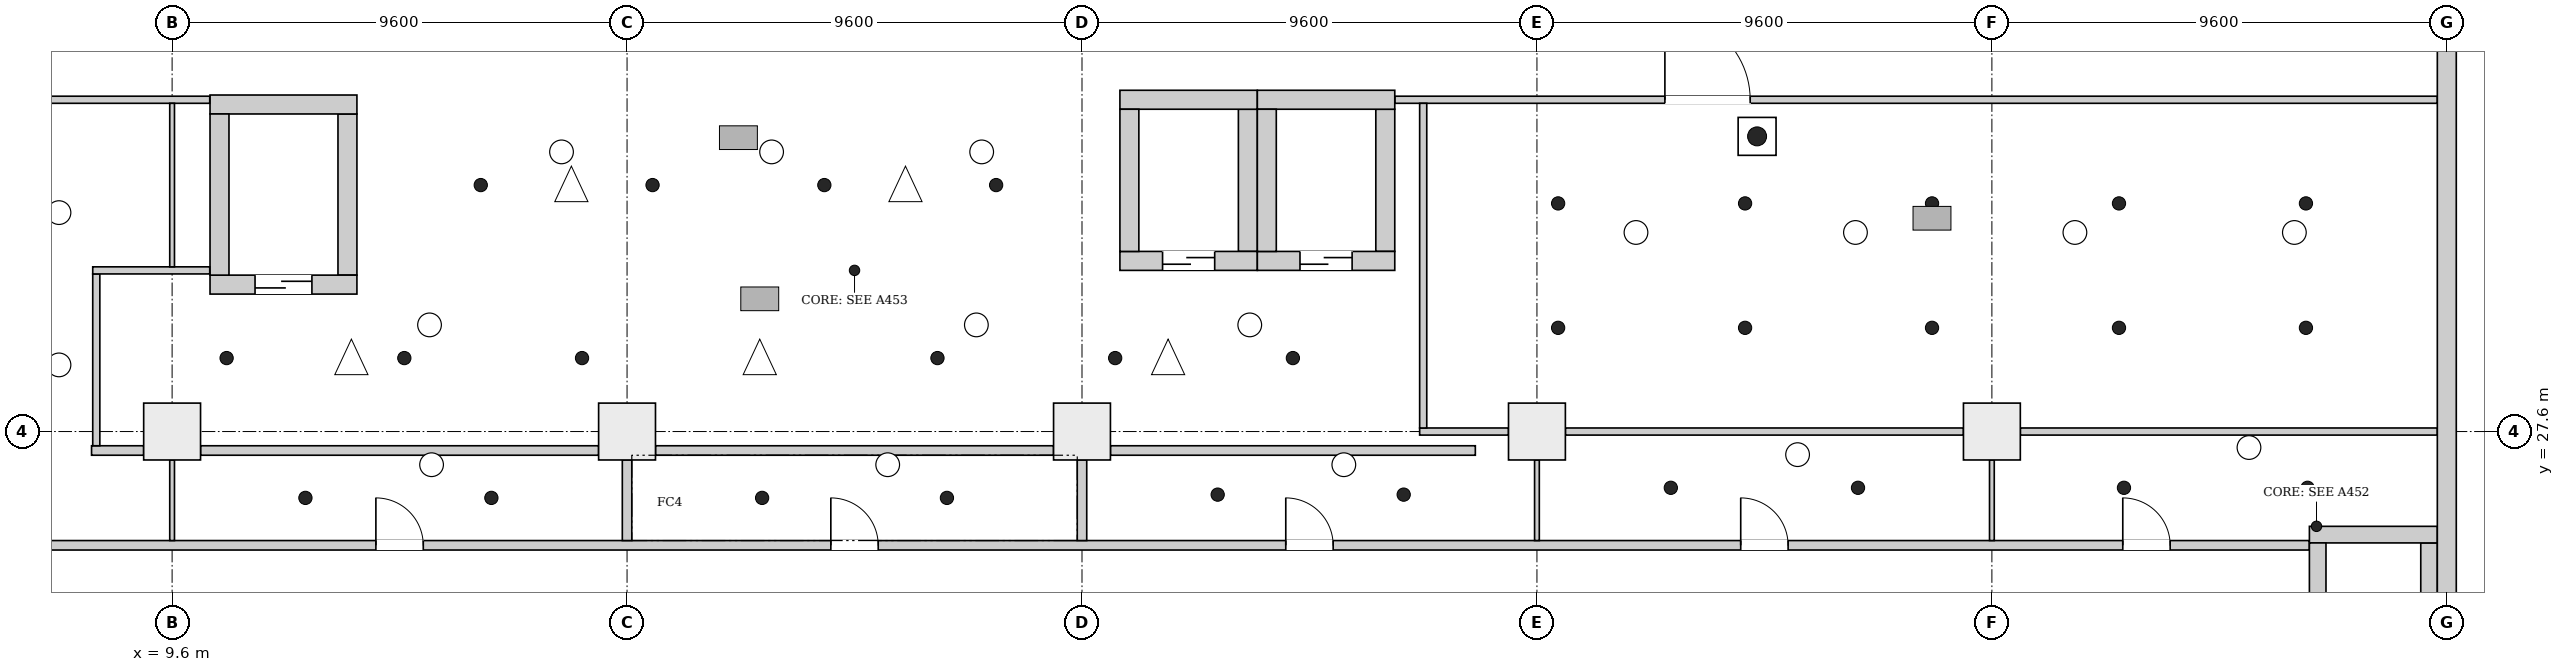
"""IFC4 building model, lengths in metres.
Left out: names, types, materials, properties, quantities, classifications, styles, units other than length and angle.
Written with IfcOpenShell. Run it as: python <this file> out.ifc"""

import sys

from ifc_helpers import new_model, si_unit, direction, frame, frame_2d, origin, origin_2d, place, context, subcontext, project, spatial, rectangle, extrude, element, fill, save


model = new_model("IFC4")
c1 = context("Model", 3, precision=1e-05, world=origin(), true_north=direction((0.0, 1.0)))
c2 = subcontext(c1, "Body", "Model", "MODEL_VIEW")
j1 = project(units=[si_unit("LENGTHUNIT", "METRE"), si_unit("PLANEANGLEUNIT", "RADIAN")], contexts=[c1])
p1 = place(None, origin())
s1 = spatial("IfcSite", under=j1, at=p1, CompositionType="ELEMENT")
p2 = place(p1, origin())
s2 = spatial("IfcBuilding", under=s1, at=p2, CompositionType="ELEMENT")
p3 = place(p2, frame((0.0, 0.0, 14.2)))
s3 = spatial("IfcBuildingStorey", under=s2, at=p3, CompositionType="ELEMENT", Elevation=14.2)
p4 = place(p3, frame((57.6, -0.2, 0.0), z_axis=(0.0, 0.0, 1.0), x_axis=(0.0, 1.0, 0.0)))
e1 = element("IfcWall", 1, at=p4, inside=s3, PredefinedType="SHEAR", context=c2, shape_type="SweptSolid", body=[
    extrude(rectangle(XDim=46.88, YDim=0.4, at=frame_2d((23.44, 0.0))), origin(), (0.0, 0.0, 1.0), 7.5),
])
p5 = place(p3, frame((54.7, 25.425, 0.0), z_axis=(0.0, 0.0, 1.0), x_axis=(1.0, 0.0, 0.0)))
e2 = element("IfcWall", 2, at=p5, inside=s3, PredefinedType="SHEAR", context=c2, shape_type="SweptSolid", body=[
    extrude(rectangle(XDim=2.7, YDim=0.35, at=frame_2d((1.35, 0.0))), origin(), (0.0, 0.0, 1.0), 7.5),
])
for number, where, z_axis, x_axis in (
    (3, (54.875, 21.75, 0.0), (0.0, 0.0, 1.0), (0.0, 1.0, 0.0)),
    (4, (57.225, 21.75, 0.0), (0.0, 0.0, 1.0), (0.0, 1.0, 0.0)),
):
    element("IfcWall", number, at=place(p3, frame(where, z_axis=z_axis, x_axis=x_axis)), inside=s3, PredefinedType="SHEAR", context=c2, shape_type="SweptSolid", body=[
        extrude(rectangle(XDim=3.5, YDim=0.35, at=frame_2d((1.75, 0.0))), origin(), (0.0, 0.0, 1.0), 7.5),
    ])
p6 = place(p3, frame((10.4, 30.7, 0.0), z_axis=(0.0, 0.0, 1.0), x_axis=(1.0, 0.0, 0.0)))
e5 = element("IfcWall", 5, at=p6, inside=s3, PredefinedType="SHEAR", context=c2, shape_type="SweptSolid", body=[
    extrude(rectangle(XDim=3.1, YDim=0.4, at=frame_2d((1.55, 0.0))), origin(), (0.0, 0.0, 1.0), 7.5),
])
p7 = place(p6, frame((0.95, 0.0, 0.0)))
e6 = element("IfcOpeningElement", 6, at=p7, cuts=e5, PredefinedType="OPENING", context=c2, shape_type="SweptSolid", body=[
    extrude(rectangle(XDim=1.2, YDim=2.1, at=frame_2d((0.6, 1.05))), frame((0.0, 0.21, 0.0), z_axis=(0.0, -1.0, 0.0), x_axis=(1.0, 0.0, 0.0)), (0.0, 0.0, 1.0), 0.42),
])
p8 = place(p3, frame((10.4, 34.5, 0.0), z_axis=(0.0, 0.0, 1.0), x_axis=(1.0, 0.0, 0.0)))
e7 = element("IfcWall", 7, at=p8, inside=s3, PredefinedType="SHEAR", context=c2, shape_type="SweptSolid", body=[
    extrude(rectangle(XDim=3.1, YDim=0.4, at=frame_2d((1.55, 0.0))), origin(), (0.0, 0.0, 1.0), 7.5),
])
for number, where, z_axis, x_axis in (
    (8, (10.6, 30.9, 0.0), (0.0, 0.0, 1.0), (0.0, 1.0, 0.0)),
    (9, (13.3, 30.9, 0.0), (0.0, 0.0, 1.0), (0.0, 1.0, 0.0)),
):
    element("IfcWall", number, at=place(p3, frame(where, z_axis=z_axis, x_axis=x_axis)), inside=s3, PredefinedType="SHEAR", context=c2, shape_type="SweptSolid", body=[
        extrude(rectangle(XDim=3.4, YDim=0.4, at=frame_2d((1.7, 0.0))), origin(), (0.0, 0.0, 1.0), 7.5),
    ])
p9 = place(p3, frame((29.6, 31.2, 0.0), z_axis=(0.0, 0.0, 1.0), x_axis=(1.0, 0.0, 0.0)))
e10 = element("IfcWall", 10, at=p9, inside=s3, PredefinedType="SHEAR", context=c2, shape_type="SweptSolid", body=[
    extrude(rectangle(XDim=2.9, YDim=0.4, at=frame_2d((1.45, 0.0))), origin(), (0.0, 0.0, 1.0), 7.5),
])
p10 = place(p9, frame((0.9, 0.0, 0.0)))
e11 = element("IfcOpeningElement", 11, at=p10, cuts=e10, PredefinedType="OPENING", context=c2, shape_type="SweptSolid", body=[
    extrude(rectangle(XDim=1.1, YDim=2.1, at=frame_2d((0.55, 1.05))), frame((0.0, 0.21, 0.0), z_axis=(0.0, -1.0, 0.0), x_axis=(1.0, 0.0, 0.0)), (0.0, 0.0, 1.0), 0.42),
])
p11 = place(p3, frame((29.6, 34.6, 0.0), z_axis=(0.0, 0.0, 1.0), x_axis=(1.0, 0.0, 0.0)))
e12 = element("IfcWall", 12, at=p11, inside=s3, PredefinedType="SHEAR", context=c2, shape_type="SweptSolid", body=[
    extrude(rectangle(XDim=2.9, YDim=0.4, at=frame_2d((1.45, 0.0))), origin(), (0.0, 0.0, 1.0), 7.5),
])
for number, where, z_axis, x_axis in (
    (13, (29.8, 31.4, 0.0), (0.0, 0.0, 1.0), (0.0, 1.0, 0.0)),
    (14, (32.3, 31.4, 0.0), (0.0, 0.0, 1.0), (0.0, 1.0, 0.0)),
):
    element("IfcWall", number, at=place(p3, frame(where, z_axis=z_axis, x_axis=x_axis)), inside=s3, PredefinedType="SHEAR", context=c2, shape_type="SweptSolid", body=[
        extrude(rectangle(XDim=3.0, YDim=0.4, at=frame_2d((1.5, 0.0))), origin(), (0.0, 0.0, 1.0), 7.5),
    ])
p12 = place(p3, frame((32.5, 31.2, 0.0), z_axis=(0.0, 0.0, 1.0), x_axis=(1.0, 0.0, 0.0)))
e15 = element("IfcWall", 15, at=p12, inside=s3, PredefinedType="SHEAR", context=c2, shape_type="SweptSolid", body=[
    extrude(rectangle(XDim=2.9, YDim=0.4, at=frame_2d((1.45, 0.0))), origin(), (0.0, 0.0, 1.0), 7.5),
])
p13 = place(p12, frame((0.9, 0.0, 0.0)))
e16 = element("IfcOpeningElement", 16, at=p13, cuts=e15, PredefinedType="OPENING", context=c2, shape_type="SweptSolid", body=[
    extrude(rectangle(XDim=1.1, YDim=2.1, at=frame_2d((0.55, 1.05))), frame((0.0, 0.21, 0.0), z_axis=(0.0, -1.0, 0.0), x_axis=(1.0, 0.0, 0.0)), (0.0, 0.0, 1.0), 0.42),
])
p14 = place(p3, frame((32.5, 34.6, 0.0), z_axis=(0.0, 0.0, 1.0), x_axis=(1.0, 0.0, 0.0)))
e17 = element("IfcWall", 17, at=p14, inside=s3, PredefinedType="SHEAR", context=c2, shape_type="SweptSolid", body=[
    extrude(rectangle(XDim=2.9, YDim=0.4, at=frame_2d((1.45, 0.0))), origin(), (0.0, 0.0, 1.0), 7.5),
])
for number, where, z_axis, x_axis in (
    (18, (32.7, 31.4, 0.0), (0.0, 0.0, 1.0), (0.0, 1.0, 0.0)),
    (19, (35.2, 31.4, 0.0), (0.0, 0.0, 1.0), (0.0, 1.0, 0.0)),
):
    element("IfcWall", number, at=place(p3, frame(where, z_axis=z_axis, x_axis=x_axis)), inside=s3, PredefinedType="SHEAR", context=c2, shape_type="SweptSolid", body=[
        extrude(rectangle(XDim=3.0, YDim=0.4, at=frame_2d((1.5, 0.0))), origin(), (0.0, 0.0, 1.0), 7.5),
    ])
for number, where, z_axis, x_axis in (
    (20, (9.6, 27.6, 0.0), (0.0, 0.0, 1.0), (1.0, 0.0, 0.0)),
    (21, (19.2, 27.6, 0.0), (0.0, 0.0, 1.0), (1.0, 0.0, 0.0)),
    (22, (28.8, 27.6, 0.0), (0.0, 0.0, 1.0), (1.0, 0.0, 0.0)),
    (23, (38.4, 27.6, 0.0), (0.0, 0.0, 1.0), (1.0, 0.0, 0.0)),
    (24, (48.0, 27.6, 0.0), (0.0, 0.0, 1.0), (1.0, 0.0, 0.0)),
):
    element("IfcColumn", number, at=place(p3, frame(where, z_axis=z_axis, x_axis=x_axis)), inside=s3, PredefinedType="COLUMN", context=c2, shape_type="SweptSolid", body=[
        extrude(rectangle(XDim=1.2, YDim=1.2, at=origin_2d()), origin(), (0.0, 0.0, 1.0), 7.5),
    ])
p15 = place(p3, frame((0.206, 25.2, 0.0), z_axis=(0.0, 0.0, 1.0), x_axis=(1.0, 0.0, 0.0)))
e25 = element("IfcWall", 25, at=p15, inside=s3, PredefinedType="PARTITIONING", context=c2, shape_type="SweptSolid", body=[
    extrude(rectangle(XDim=54.488, YDim=0.2, at=frame_2d((27.244, 0.0))), origin(), (0.0, 0.0, 1.0), 7.15),
])
p16 = place(p15, frame((4.282, 0.0, 0.0)))
e26 = element("IfcOpeningElement", 26, at=p16, cuts=e25, PredefinedType="OPENING", context=c2, shape_type="SweptSolid", body=[
    extrude(rectangle(XDim=1.0, YDim=2.1, at=frame_2d((0.5, 1.05))), frame((0.0, 0.11, 0.0), z_axis=(0.0, -1.0, 0.0), x_axis=(1.0, 0.0, 0.0)), (0.0, 0.0, 1.0), 0.22),
])
p17 = place(p15, frame((13.694, 0.0, 0.0)))
e27 = element("IfcOpeningElement", 27, at=p17, cuts=e25, PredefinedType="OPENING", context=c2, shape_type="SweptSolid", body=[
    extrude(rectangle(XDim=1.0, YDim=2.1, at=frame_2d((0.5, 1.05))), frame((0.0, 0.11, 0.0), z_axis=(0.0, -1.0, 0.0), x_axis=(1.0, 0.0, 0.0)), (0.0, 0.0, 1.0), 0.22),
])
p18 = place(p15, frame((23.294, 0.0, 0.0)))
e28 = element("IfcOpeningElement", 28, at=p18, cuts=e25, PredefinedType="OPENING", context=c2, shape_type="SweptSolid", body=[
    extrude(rectangle(XDim=1.0, YDim=2.1, at=frame_2d((0.5, 1.05))), frame((0.0, 0.11, 0.0), z_axis=(0.0, -1.0, 0.0), x_axis=(1.0, 0.0, 0.0)), (0.0, 0.0, 1.0), 0.22),
])
p19 = place(p15, frame((32.894, 0.0, 0.0)))
e29 = element("IfcOpeningElement", 29, at=p19, cuts=e25, PredefinedType="OPENING", context=c2, shape_type="SweptSolid", body=[
    extrude(rectangle(XDim=1.0, YDim=2.1, at=frame_2d((0.5, 1.05))), frame((0.0, 0.11, 0.0), z_axis=(0.0, -1.0, 0.0), x_axis=(1.0, 0.0, 0.0)), (0.0, 0.0, 1.0), 0.22),
])
p20 = place(p15, frame((42.494, 0.0, 0.0)))
e30 = element("IfcOpeningElement", 30, at=p20, cuts=e25, PredefinedType="OPENING", context=c2, shape_type="SweptSolid", body=[
    extrude(rectangle(XDim=1.0, YDim=2.1, at=frame_2d((0.5, 1.05))), frame((0.0, 0.11, 0.0), z_axis=(0.0, -1.0, 0.0), x_axis=(1.0, 0.0, 0.0)), (0.0, 0.0, 1.0), 0.22),
])
p21 = place(p15, frame((50.556, 0.0, 0.0)))
e31 = element("IfcOpeningElement", 31, at=p21, cuts=e25, PredefinedType="OPENING", context=c2, shape_type="SweptSolid", body=[
    extrude(rectangle(XDim=1.0, YDim=2.1, at=frame_2d((0.5, 1.05))), frame((0.0, 0.11, 0.0), z_axis=(0.0, -1.0, 0.0), x_axis=(1.0, 0.0, 0.0)), (0.0, 0.0, 1.0), 0.22),
])
p22 = place(p3, frame((2.706, 34.6, 0.0), z_axis=(0.0, 0.0, 1.0), x_axis=(1.0, 0.0, 0.0)))
e32 = element("IfcWall", 32, at=p22, inside=s3, PredefinedType="PARTITIONING", context=c2, shape_type="SweptSolid", body=[
    extrude(rectangle(XDim=7.688, YDim=0.15, at=frame_2d((3.844, 0.0))), origin(), (0.0, 0.0, 1.0), 7.15),
])
p23 = place(p3, frame((7.9, 27.2, 0.0), z_axis=(0.0, 0.0, 1.0), x_axis=(1.0, 0.0, 0.0)))
e33 = element("IfcWall", 33, at=p23, inside=s3, PredefinedType="PARTITIONING", context=c2, shape_type="SweptSolid", body=[
    extrude(rectangle(XDim=1.1, YDim=0.2, at=frame_2d((0.55, 0.0))), origin(), (0.0, 0.0, 1.0), 7.15),
])
p24 = place(p3, frame((8.0, 27.3, 0.0), z_axis=(0.0, 0.0, 1.0), x_axis=(0.0, 1.0, 0.0)))
e34 = element("IfcWall", 34, at=p24, inside=s3, PredefinedType="PARTITIONING", context=c2, shape_type="SweptSolid", body=[
    extrude(rectangle(XDim=3.625, YDim=0.15, at=frame_2d((1.812, 0.0))), origin(), (0.0, 0.0, 1.0), 7.15),
])
p25 = place(p3, frame((7.925, 31.0, 0.0), z_axis=(0.0, 0.0, 1.0), x_axis=(1.0, 0.0, 0.0)))
e35 = element("IfcWall", 35, at=p25, inside=s3, PredefinedType="PARTITIONING", context=c2, shape_type="SweptSolid", body=[
    extrude(rectangle(XDim=2.469, YDim=0.15, at=frame_2d((1.234, 0.0))), origin(), (0.0, 0.0, 1.0), 7.15),
])
p26 = place(p3, frame((9.6, 25.3, 0.0), z_axis=(0.0, 0.0, 1.0), x_axis=(0.0, 1.0, 0.0)))
e36 = element("IfcWall", 36, at=p26, inside=s3, PredefinedType="PARTITIONING", context=c2, shape_type="SweptSolid", body=[
    extrude(rectangle(XDim=1.7, YDim=0.1, at=frame_2d((0.85, 0.0))), origin(), (0.0, 0.0, 1.0), 6.75),
])
p27 = place(p3, frame((9.6, 31.075, 0.0), z_axis=(0.0, 0.0, 1.0), x_axis=(0.0, 1.0, 0.0)))
e37 = element("IfcWall", 37, at=p27, inside=s3, PredefinedType="PARTITIONING", context=c2, shape_type="SweptSolid", body=[
    extrude(rectangle(XDim=3.45, YDim=0.1, at=frame_2d((1.725, 0.0))), origin(), (0.0, 0.0, 1.0), 6.75),
])
p28 = place(p3, frame((10.2, 27.2, 0.0), z_axis=(0.0, 0.0, 1.0), x_axis=(1.0, 0.0, 0.0)))
e38 = element("IfcWall", 38, at=p28, inside=s3, PredefinedType="PARTITIONING", context=c2, shape_type="SweptSolid", body=[
    extrude(rectangle(XDim=8.4, YDim=0.2, at=frame_2d((4.2, 0.0))), origin(), (0.0, 0.0, 1.0), 7.15),
])
p29 = place(p3, frame((19.2, 25.3, 0.0), z_axis=(0.0, 0.0, 1.0), x_axis=(0.0, 1.0, 0.0)))
e39 = element("IfcWall", 39, at=p29, inside=s3, PredefinedType="PARTITIONING", context=c2, shape_type="SweptSolid", body=[
    extrude(rectangle(XDim=1.7, YDim=0.2, at=frame_2d((0.85, 0.0))), origin(), (0.0, 0.0, 1.0), 6.75),
])
p30 = place(p3, frame((19.8, 27.2, 0.0), z_axis=(0.0, 0.0, 1.0), x_axis=(1.0, 0.0, 0.0)))
e40 = element("IfcWall", 40, at=p30, inside=s3, PredefinedType="PARTITIONING", context=c2, shape_type="SweptSolid", body=[
    extrude(rectangle(XDim=8.4, YDim=0.2, at=frame_2d((4.2, 0.0))), origin(), (0.0, 0.0, 1.0), 7.15),
])
p31 = place(p3, frame((28.8, 25.3, 0.0), z_axis=(0.0, 0.0, 1.0), x_axis=(0.0, 1.0, 0.0)))
e41 = element("IfcWall", 41, at=p31, inside=s3, PredefinedType="PARTITIONING", context=c2, shape_type="SweptSolid", body=[
    extrude(rectangle(XDim=1.7, YDim=0.2, at=frame_2d((0.85, 0.0))), origin(), (0.0, 0.0, 1.0), 6.75),
])
p32 = place(p3, frame((29.4, 27.2, 0.0), z_axis=(0.0, 0.0, 1.0), x_axis=(1.0, 0.0, 0.0)))
e42 = element("IfcWall", 42, at=p32, inside=s3, PredefinedType="PARTITIONING", context=c2, shape_type="SweptSolid", body=[
    extrude(rectangle(XDim=7.7, YDim=0.2, at=frame_2d((3.85, 0.0))), origin(), (0.0, 0.0, 1.0), 7.15),
])
p33 = place(p3, frame((35.406, 34.6, 0.0), z_axis=(0.0, 0.0, 1.0), x_axis=(1.0, 0.0, 0.0)))
e43 = element("IfcWall", 43, at=p33, inside=s3, PredefinedType="PARTITIONING", context=c2, shape_type="SweptSolid", body=[
    extrude(rectangle(XDim=21.988, YDim=0.15, at=frame_2d((10.994, 0.0))), origin(), (0.0, 0.0, 1.0), 7.15),
])
p34 = place(p33, frame((5.694, 0.0, 0.0)))
e44 = element("IfcOpeningElement", 44, at=p34, cuts=e43, PredefinedType="OPENING", context=c2, shape_type="SweptSolid", body=[
    extrude(rectangle(XDim=1.8, YDim=2.1, at=frame_2d((0.9, 1.05))), frame((0.0, 0.085, 0.0), z_axis=(0.0, -1.0, 0.0), x_axis=(1.0, 0.0, 0.0)), (0.0, 0.0, 1.0), 0.17),
])
p35 = place(p3, frame((35.925, 27.6, 0.0), z_axis=(0.0, 0.0, 1.0), x_axis=(1.0, 0.0, 0.0)))
e45 = element("IfcWall", 45, at=p35, inside=s3, PredefinedType="PARTITIONING", context=c2, shape_type="SweptSolid", body=[
    extrude(rectangle(XDim=1.875, YDim=0.15, at=frame_2d((0.938, 0.0))), origin(), (0.0, 0.0, 1.0), 6.45),
])
p36 = place(p3, frame((36.0, 27.675, 0.0), z_axis=(0.0, 0.0, 1.0), x_axis=(0.0, 1.0, 0.0)))
e46 = element("IfcWall", 46, at=p36, inside=s3, PredefinedType="PARTITIONING", context=c2, shape_type="SweptSolid", body=[
    extrude(rectangle(XDim=6.85, YDim=0.15, at=frame_2d((3.425, 0.0))), origin(), (0.0, 0.0, 1.0), 7.15),
])
p37 = place(p3, frame((38.4, 25.3, 0.0), z_axis=(0.0, 0.0, 1.0), x_axis=(0.0, 1.0, 0.0)))
e47 = element("IfcWall", 47, at=p37, inside=s3, PredefinedType="PARTITIONING", context=c2, shape_type="SweptSolid", body=[
    extrude(rectangle(XDim=1.7, YDim=0.1, at=frame_2d((0.85, 0.0))), origin(), (0.0, 0.0, 1.0), 6.75),
])
p38 = place(p3, frame((39.0, 27.6, 0.0), z_axis=(0.0, 0.0, 1.0), x_axis=(1.0, 0.0, 0.0)))
e48 = element("IfcWall", 48, at=p38, inside=s3, PredefinedType="PARTITIONING", context=c2, shape_type="SweptSolid", body=[
    extrude(rectangle(XDim=8.4, YDim=0.15, at=frame_2d((4.2, 0.0))), origin(), (0.0, 0.0, 1.0), 6.45),
])
p39 = place(p3, frame((48.0, 25.3, 0.0), z_axis=(0.0, 0.0, 1.0), x_axis=(0.0, 1.0, 0.0)))
e49 = element("IfcWall", 49, at=p39, inside=s3, PredefinedType="PARTITIONING", context=c2, shape_type="SweptSolid", body=[
    extrude(rectangle(XDim=1.7, YDim=0.1, at=frame_2d((0.85, 0.0))), origin(), (0.0, 0.0, 1.0), 6.75),
])
p40 = place(p3, frame((48.6, 27.6, 0.0), z_axis=(0.0, 0.0, 1.0), x_axis=(1.0, 0.0, 0.0)))
e50 = element("IfcWall", 50, at=p40, inside=s3, PredefinedType="PARTITIONING", context=c2, shape_type="SweptSolid", body=[
    extrude(rectangle(XDim=8.794, YDim=0.15, at=frame_2d((4.397, 0.0))), origin(), (0.0, 0.0, 1.0), 6.45),
])
p41 = place(p7, origin())
e51 = element("IfcDoor", 51, at=p41, inside=s3, OperationType="DOUBLE_DOOR_SLIDING", PredefinedType="DOOR", context=c2, shape_type="SweptSolid", body=[
    extrude(rectangle(XDim=1.2, YDim=2.1, at=frame_2d((0.6, 1.05))), frame((0.0, 0.025, 0.0), z_axis=(0.0, -1.0, 0.0), x_axis=(1.0, 0.0, 0.0)), (0.0, 0.0, 1.0), 0.05),
])
fill(e6, e51)
p42 = place(p10, origin())
e52 = element("IfcDoor", 52, at=p42, inside=s3, OperationType="DOUBLE_DOOR_SLIDING", PredefinedType="DOOR", context=c2, shape_type="SweptSolid", body=[
    extrude(rectangle(XDim=1.1, YDim=2.1, at=frame_2d((0.55, 1.05))), frame((0.0, 0.025, 0.0), z_axis=(0.0, -1.0, 0.0), x_axis=(1.0, 0.0, 0.0)), (0.0, 0.0, 1.0), 0.05),
])
fill(e11, e52)
p43 = place(p13, origin())
e53 = element("IfcDoor", 53, at=p43, inside=s3, OperationType="DOUBLE_DOOR_SLIDING", PredefinedType="DOOR", context=c2, shape_type="SweptSolid", body=[
    extrude(rectangle(XDim=1.1, YDim=2.1, at=frame_2d((0.55, 1.05))), frame((0.0, 0.025, 0.0), z_axis=(0.0, -1.0, 0.0), x_axis=(1.0, 0.0, 0.0)), (0.0, 0.0, 1.0), 0.05),
])
fill(e16, e53)
p44 = place(p17, origin())
e54 = element("IfcDoor", 54, at=p44, inside=s3, OperationType="SINGLE_SWING_LEFT", PredefinedType="DOOR", context=c2, shape_type="SweptSolid", body=[
    extrude(rectangle(XDim=1.0, YDim=2.1, at=frame_2d((0.5, 1.05))), frame((0.0, 0.025, 0.0), z_axis=(0.0, -1.0, 0.0), x_axis=(1.0, 0.0, 0.0)), (0.0, 0.0, 1.0), 0.05),
])
fill(e27, e54)
p45 = place(p18, origin())
e55 = element("IfcDoor", 55, at=p45, inside=s3, OperationType="SINGLE_SWING_RIGHT", PredefinedType="DOOR", context=c2, shape_type="SweptSolid", body=[
    extrude(rectangle(XDim=1.0, YDim=2.1, at=frame_2d((0.5, 1.05))), frame((0.0, 0.025, 0.0), z_axis=(0.0, -1.0, 0.0), x_axis=(1.0, 0.0, 0.0)), (0.0, 0.0, 1.0), 0.05),
])
fill(e28, e55)
p46 = place(p19, origin())
e56 = element("IfcDoor", 56, at=p46, inside=s3, OperationType="SINGLE_SWING_RIGHT", PredefinedType="DOOR", context=c2, shape_type="SweptSolid", body=[
    extrude(rectangle(XDim=1.0, YDim=2.1, at=frame_2d((0.5, 1.05))), frame((0.0, 0.025, 0.0), z_axis=(0.0, -1.0, 0.0), x_axis=(1.0, 0.0, 0.0)), (0.0, 0.0, 1.0), 0.05),
])
fill(e29, e56)
p47 = place(p20, origin())
e57 = element("IfcDoor", 57, at=p47, inside=s3, OperationType="SINGLE_SWING_RIGHT", PredefinedType="DOOR", context=c2, shape_type="SweptSolid", body=[
    extrude(rectangle(XDim=1.0, YDim=2.1, at=frame_2d((0.5, 1.05))), frame((0.0, 0.025, 0.0), z_axis=(0.0, -1.0, 0.0), x_axis=(1.0, 0.0, 0.0)), (0.0, 0.0, 1.0), 0.05),
])
fill(e30, e57)
p48 = place(p21, origin())
e58 = element("IfcDoor", 58, at=p48, inside=s3, OperationType="SINGLE_SWING_RIGHT", PredefinedType="DOOR", context=c2, shape_type="SweptSolid", body=[
    extrude(rectangle(XDim=1.0, YDim=2.1, at=frame_2d((0.5, 1.05))), frame((0.0, 0.025, 0.0), z_axis=(0.0, -1.0, 0.0), x_axis=(1.0, 0.0, 0.0)), (0.0, 0.0, 1.0), 0.05),
])
fill(e31, e58)
p49 = place(p34, origin())
e59 = element("IfcDoor", 59, at=p49, inside=s3, OperationType="DOUBLE_DOOR_SINGLE_SWING", PredefinedType="DOOR", context=c2, shape_type="SweptSolid", body=[
    extrude(rectangle(XDim=1.8, YDim=2.1, at=frame_2d((0.9, 1.05))), frame((0.0, 0.025, 0.0), z_axis=(0.0, -1.0, 0.0), x_axis=(1.0, 0.0, 0.0)), (0.0, 0.0, 1.0), 0.05),
])
fill(e44, e59)
save(model, sys.argv[1])
